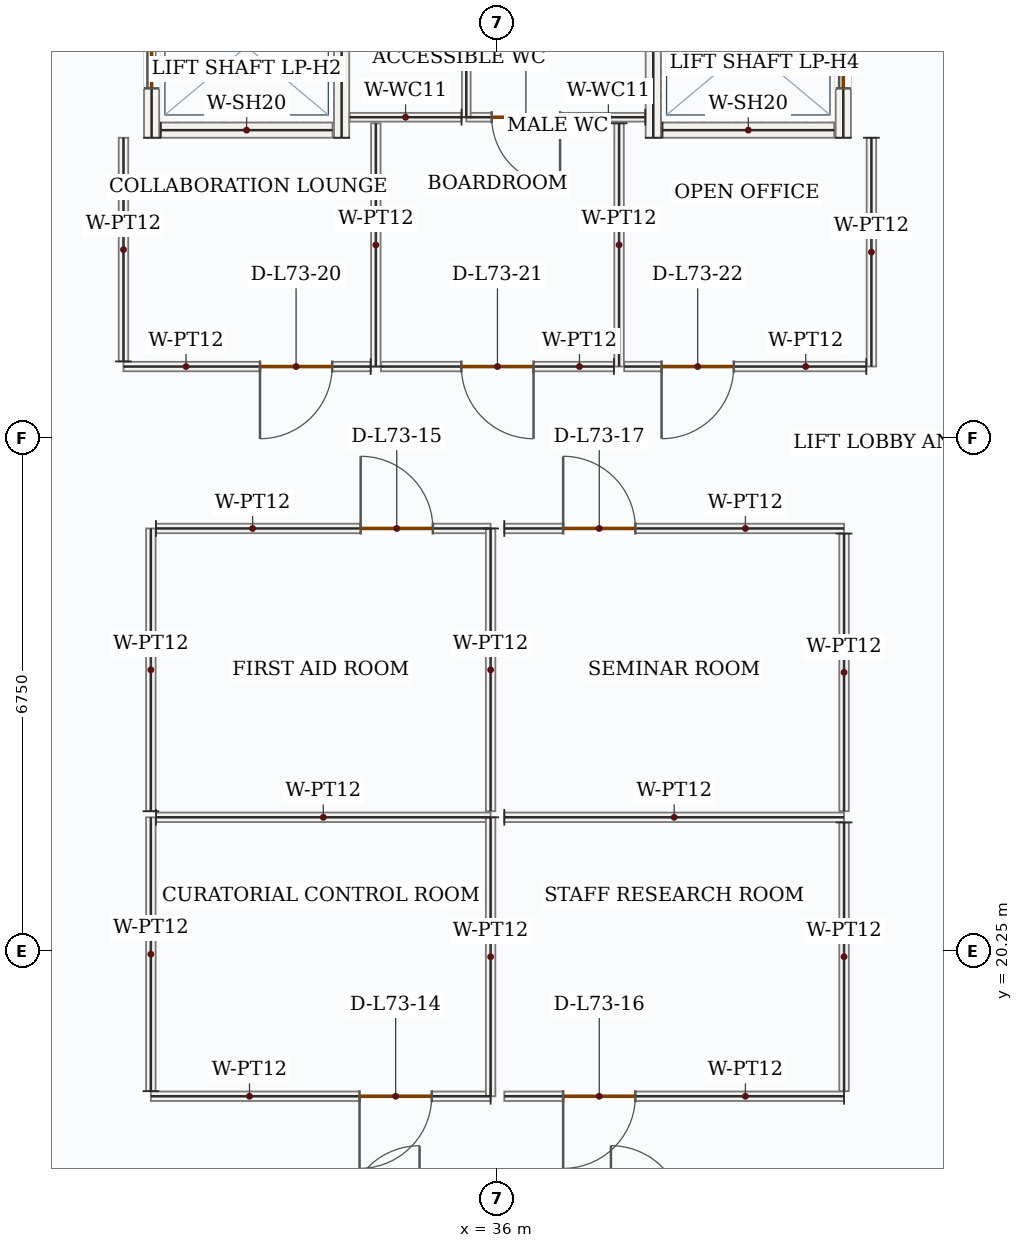
"""IFC4 building model, lengths in metres.
Left out: names, types, materials, properties, quantities, classifications, styles, units other than length and angle.
Written with IfcOpenShell. Run it as: python <this file> out.ifc"""

import sys

from ifc_helpers import new_model, si_unit, direction, frame, frame_2d, origin, place, context, subcontext, project, spatial, rectangle, extrude, source, transform, mapped, element, fill, save


model = new_model("IFC4")
c1 = context("Model", 3, precision=1e-05, world=origin(), true_north=direction((0.0, 1.0)))
c2 = subcontext(c1, "Body", "Model", "MODEL_VIEW")
j1 = project(units=[si_unit("LENGTHUNIT", "METRE"), si_unit("PLANEANGLEUNIT", "RADIAN")], contexts=[c1])
p1 = place(None, origin())
s1 = spatial("IfcSite", under=j1, at=p1, CompositionType="ELEMENT")
p2 = place(p1, origin())
s2 = spatial("IfcBuilding", under=s1, at=p2, CompositionType="ELEMENT")
p3 = place(p2, frame((0.0, 0.0, 302.85)))
s3 = spatial("IfcBuildingStorey", under=s2, at=p3, CompositionType="ELEMENT", Elevation=302.85)
p4 = place(p3, frame((31.45, 30.95, 0.0), z_axis=(0.0, 0.0, 1.0), x_axis=(0.0, 1.0, 0.0)))
e1 = element("IfcWall", 1, at=p4, inside=s3, PredefinedType="SOLIDWALL", context=c2, shape_type="SweptSolid", body=[
    extrude(rectangle(XDim=2.4, YDim=0.2, at=frame_2d((1.2, 0.0))), origin(), (0.0, 0.0, 1.0), 3.5),
])
p5 = place(p4, frame((0.65, 0.0, 0.0)))
e2 = element("IfcOpeningElement", 2, at=p5, cuts=e1, PredefinedType="OPENING", context=c2, shape_type="SweptSolid", body=[
    extrude(rectangle(XDim=1.1, YDim=2.15, at=frame_2d((0.55, 1.075))), frame((0.0, 0.11, 0.0), z_axis=(0.0, -1.0, 0.0), x_axis=(1.0, 0.0, 0.0)), (0.0, 0.0, 1.0), 0.22),
])
m1 = source(origin(), c2, "Body", "SweptSolid", [
    extrude(rectangle(XDim=2.4, YDim=0.2, at=frame_2d((1.2, 0.0))), origin(), (0.0, 0.0, 1.0), 3.5),
])
p6 = place(p3, frame((33.95, 30.95, 0.0), z_axis=(0.0, 0.0, 1.0), x_axis=(0.0, 1.0, 0.0)))
e3 = element("IfcWall", 3, at=p6, inside=s3, PredefinedType="SOLIDWALL", context=c2, shape_type="MappedRepresentation", body=[
    mapped(m1, transform((0.0, 0.0, 0.0), x_axis=(1.0, 0.0, 0.0), y_axis=(0.0, 1.0, 0.0), z_axis=(0.0, 0.0, 1.0), scale=1.0)),
])
m2 = source(origin(), c2, "Body", "SweptSolid", [
    extrude(rectangle(XDim=2.26, YDim=0.2, at=frame_2d((1.13, 0.0))), origin(), (0.0, 0.0, 1.0), 3.5),
])
p7 = place(p3, frame((31.57, 31.05, 0.0), z_axis=(0.0, 0.0, 1.0), x_axis=(1.0, 0.0, 0.0)))
e4 = element("IfcWall", 4, at=p7, inside=s3, PredefinedType="SOLIDWALL", context=c2, shape_type="MappedRepresentation", body=[
    mapped(m2, transform((0.0, 0.0, 0.0), x_axis=(1.0, 0.0, 0.0), y_axis=(0.0, 1.0, 0.0), z_axis=(0.0, 0.0, 1.0), scale=1.0)),
])
p8 = place(p3, frame((38.05, 30.95, 0.0), z_axis=(0.0, 0.0, 1.0), x_axis=(0.0, 1.0, 0.0)))
e5 = element("IfcWall", 5, at=p8, inside=s3, PredefinedType="SOLIDWALL", context=c2, shape_type="MappedRepresentation", body=[
    mapped(m1, transform((0.0, 0.0, 0.0), x_axis=(1.0, 0.0, 0.0), y_axis=(0.0, 1.0, 0.0), z_axis=(0.0, 0.0, 1.0), scale=1.0)),
])
p9 = place(p3, frame((40.55, 30.95, 0.0), z_axis=(0.0, 0.0, 1.0), x_axis=(0.0, 1.0, 0.0)))
e6 = element("IfcWall", 6, at=p9, inside=s3, PredefinedType="SOLIDWALL", context=c2, shape_type="SweptSolid", body=[
    extrude(rectangle(XDim=2.4, YDim=0.2, at=frame_2d((1.2, 0.0))), origin(), (0.0, 0.0, 1.0), 3.5),
])
p10 = place(p9, frame((0.65, 0.0, 0.0)))
e7 = element("IfcOpeningElement", 7, at=p10, cuts=e6, PredefinedType="OPENING", context=c2, shape_type="SweptSolid", body=[
    extrude(rectangle(XDim=1.1, YDim=2.15, at=frame_2d((0.55, 1.075))), frame((0.0, 0.11, 0.0), z_axis=(0.0, -1.0, 0.0), x_axis=(1.0, 0.0, 0.0)), (0.0, 0.0, 1.0), 0.22),
])
p11 = place(p3, frame((38.17, 31.05, 0.0), z_axis=(0.0, 0.0, 1.0), x_axis=(1.0, 0.0, 0.0)))
e8 = element("IfcWall", 8, at=p11, inside=s3, PredefinedType="SOLIDWALL", context=c2, shape_type="MappedRepresentation", body=[
    mapped(m2, transform((0.0, 0.0, 0.0), x_axis=(1.0, 0.0, 0.0), y_axis=(0.0, 1.0, 0.0), z_axis=(0.0, 0.0, 1.0), scale=1.0)),
])
p12 = place(p3, frame((37.945, 31.22, 0.0), z_axis=(0.0, 0.0, 1.0), x_axis=(-1.0, 0.0, 0.0)))
e9 = element("IfcWall", 9, at=p12, inside=s3, PredefinedType="PARTITIONING", context=c2, shape_type="SweptSolid", body=[
    extrude(rectangle(XDim=2.355, YDim=0.115, at=frame_2d((1.177, 0.0))), origin(), (0.0, 0.0, 1.0), 3.5),
])
p13 = place(p12, frame((1.121, 0.0, 0.0)))
e10 = element("IfcOpeningElement", 10, at=p13, cuts=e9, PredefinedType="OPENING", context=c2, shape_type="SweptSolid", body=[
    extrude(rectangle(XDim=0.9, YDim=2.1, at=frame_2d((0.45, 1.05))), frame((0.0, 0.067, 0.0), z_axis=(0.0, -1.0, 0.0), x_axis=(1.0, 0.0, 0.0)), (0.0, 0.0, 1.0), 0.135),
])
m3 = source(origin(), c2, "Body", "SweptSolid", [
    extrude(rectangle(XDim=1.96, YDim=0.115, at=frame_2d((0.98, 0.0))), origin(), (0.0, 0.0, 1.0), 3.5),
])
p14 = place(p3, frame((35.59, 31.22, 0.0), z_axis=(0.0, 0.0, 1.0), x_axis=(0.0, 1.0, 0.0)))
e11 = element("IfcWall", 11, at=p14, inside=s3, PredefinedType="PARTITIONING", context=c2, shape_type="MappedRepresentation", body=[
    mapped(m3, transform((0.0, 0.0, 0.0), x_axis=(1.0, 0.0, 0.0), y_axis=(0.0, 1.0, 0.0), z_axis=(0.0, 0.0, 1.0), scale=1.0)),
])
m4 = source(origin(), c2, "Body", "SweptSolid", [
    extrude(rectangle(XDim=1.473, YDim=0.115, at=frame_2d((0.736, 0.0))), origin(), (0.0, 0.0, 1.0), 3.5),
])
p15 = place(p3, frame((35.528, 31.22, 0.0), z_axis=(0.0, 0.0, 1.0), x_axis=(-1.0, 0.0, 0.0)))
e12 = element("IfcWall", 12, at=p15, inside=s3, PredefinedType="PARTITIONING", context=c2, shape_type="MappedRepresentation", body=[
    mapped(m4, transform((0.0, 0.0, 0.0), x_axis=(1.0, 0.0, 0.0), y_axis=(0.0, 1.0, 0.0), z_axis=(0.0, 0.0, 1.0), scale=1.0)),
])
m5 = source(origin(), c2, "Body", "SweptSolid", [
    extrude(rectangle(XDim=3.2, YDim=0.125, at=frame_2d((1.6, 0.0))), origin(), (0.0, 0.0, 1.0), 3.5),
])
for number, where, z_axis, x_axis in (
    (13, (34.4, 27.94, 0.0), (0.0, 0.0, 1.0), (0.0, 1.0, 0.0)),
    (14, (37.6, 31.14, 0.0), (0.0, 0.0, 1.0), (0.0, -1.0, 0.0)),
):
    element("IfcWall", number, at=place(p3, frame(where, z_axis=z_axis, x_axis=x_axis)), inside=s3, PredefinedType="PARTITIONING", context=c2, shape_type="MappedRepresentation", body=[
        mapped(m5, transform((0.0, 0.0, 0.0), x_axis=(1.0, 0.0, 0.0), y_axis=(0.0, 1.0, 0.0), z_axis=(0.0, 0.0, 1.0), scale=1.0)),
    ])
p16 = place(p3, frame((37.532, 27.94, 0.0), z_axis=(0.0, 0.0, 1.0), x_axis=(-1.0, 0.0, 0.0)))
e15 = element("IfcWall", 15, at=p16, inside=s3, PredefinedType="PARTITIONING", context=c2, shape_type="SweptSolid", body=[
    extrude(rectangle(XDim=3.065, YDim=0.125, at=frame_2d((1.532, 0.0))), origin(), (0.0, 0.0, 1.0), 3.5),
])
p17 = place(p16, frame((1.058, 0.0, 0.0)))
e16 = element("IfcOpeningElement", 16, at=p17, cuts=e15, PredefinedType="OPENING", context=c2, shape_type="SweptSolid", body=[
    extrude(rectangle(XDim=0.95, YDim=2.15, at=frame_2d((0.475, 1.075))), frame((0.0, 0.073, 0.0), z_axis=(0.0, -1.0, 0.0), x_axis=(1.0, 0.0, 0.0)), (0.0, 0.0, 1.0), 0.145),
])
p18 = place(p3, frame((34.333, 27.94, 0.0), z_axis=(0.0, 0.0, 1.0), x_axis=(-1.0, 0.0, 0.0)))
e17 = element("IfcWall", 17, at=p18, inside=s3, PredefinedType="PARTITIONING", context=c2, shape_type="SweptSolid", body=[
    extrude(rectangle(XDim=3.252, YDim=0.125, at=frame_2d((1.626, 0.0))), origin(), (0.0, 0.0, 1.0), 3.5),
])
p19 = place(p18, frame((0.507, 0.0, 0.0)))
e18 = element("IfcOpeningElement", 18, at=p19, cuts=e17, PredefinedType="OPENING", context=c2, shape_type="SweptSolid", body=[
    extrude(rectangle(XDim=0.95, YDim=2.15, at=frame_2d((0.475, 1.075))), frame((0.0, 0.073, 0.0), z_axis=(0.0, -1.0, 0.0), x_axis=(1.0, 0.0, 0.0)), (0.0, 0.0, 1.0), 0.145),
])
m6 = source(origin(), c2, "Body", "SweptSolid", [
    extrude(rectangle(XDim=2.942, YDim=0.125, at=frame_2d((1.471, 0.0))), origin(), (0.0, 0.0, 1.0), 3.5),
])
p20 = place(p3, frame((31.08, 28.008, 0.0), z_axis=(0.0, 0.0, 1.0), x_axis=(0.0, 1.0, 0.0)))
e19 = element("IfcWall", 19, at=p20, inside=s3, PredefinedType="PARTITIONING", context=c2, shape_type="MappedRepresentation", body=[
    mapped(m6, transform((0.0, 0.0, 0.0), x_axis=(1.0, 0.0, 0.0), y_axis=(0.0, 1.0, 0.0), z_axis=(0.0, 0.0, 1.0), scale=1.0)),
])
m7 = source(origin(), c2, "Body", "SweptSolid", [
    extrude(rectangle(XDim=3.01, YDim=0.125, at=frame_2d((1.505, 0.0))), origin(), (0.0, 0.0, 1.0), 3.5),
])
p21 = place(p3, frame((40.92, 30.95, 0.0), z_axis=(0.0, 0.0, 1.0), x_axis=(0.0, -1.0, 0.0)))
e20 = element("IfcWall", 20, at=p21, inside=s3, PredefinedType="PARTITIONING", context=c2, shape_type="MappedRepresentation", body=[
    mapped(m7, transform((0.0, 0.0, 0.0), x_axis=(1.0, 0.0, 0.0), y_axis=(0.0, 1.0, 0.0), z_axis=(0.0, 0.0, 1.0), scale=1.0)),
])
p22 = place(p3, frame((40.853, 27.94, 0.0), z_axis=(0.0, 0.0, 1.0), x_axis=(-1.0, 0.0, 0.0)))
e21 = element("IfcWall", 21, at=p22, inside=s3, PredefinedType="PARTITIONING", context=c2, shape_type="SweptSolid", body=[
    extrude(rectangle(XDim=3.185, YDim=0.125, at=frame_2d((1.593, 0.0))), origin(), (0.0, 0.0, 1.0), 3.5),
])
p23 = place(p22, frame((1.743, 0.0, 0.0)))
e22 = element("IfcOpeningElement", 22, at=p23, cuts=e21, PredefinedType="OPENING", context=c2, shape_type="SweptSolid", body=[
    extrude(rectangle(XDim=0.95, YDim=2.15, at=frame_2d((0.475, 1.075))), frame((0.0, 0.073, 0.0), z_axis=(0.0, -1.0, 0.0), x_axis=(1.0, 0.0, 0.0)), (0.0, 0.0, 1.0), 0.145),
])
p24 = place(p3, frame((35.91, 18.34, 0.0), z_axis=(0.0, 0.0, 1.0), x_axis=(-1.0, 0.0, 0.0)))
e23 = element("IfcWall", 23, at=p24, inside=s3, PredefinedType="PARTITIONING", context=c2, shape_type="SweptSolid", body=[
    extrude(rectangle(XDim=4.47, YDim=0.125, at=frame_2d((2.235, 0.0))), origin(), (0.0, 0.0, 1.0), 3.5),
])
p25 = place(p24, frame((0.774, 0.0, 0.0)))
e24 = element("IfcOpeningElement", 24, at=p25, cuts=e23, PredefinedType="OPENING", context=c2, shape_type="SweptSolid", body=[
    extrude(rectangle(XDim=0.95, YDim=2.15, at=frame_2d((0.475, 1.075))), frame((0.0, 0.073, 0.0), z_axis=(0.0, -1.0, 0.0), x_axis=(1.0, 0.0, 0.0)), (0.0, 0.0, 1.0), 0.145),
])
m8 = source(origin(), c2, "Body", "SweptSolid", [
    extrude(rectangle(XDim=3.603, YDim=0.125, at=frame_2d((1.801, 0.0))), origin(), (0.0, 0.0, 1.0), 3.5),
])
p26 = place(p3, frame((31.44, 18.407, 0.0), z_axis=(0.0, 0.0, 1.0), x_axis=(0.0, 1.0, 0.0)))
e25 = element("IfcWall", 25, at=p26, inside=s3, PredefinedType="PARTITIONING", context=c2, shape_type="MappedRepresentation", body=[
    mapped(m8, transform((0.0, 0.0, 0.0), x_axis=(1.0, 0.0, 0.0), y_axis=(0.0, 1.0, 0.0), z_axis=(0.0, 0.0, 1.0), scale=1.0)),
])
m9 = source(origin(), c2, "Body", "SweptSolid", [
    extrude(rectangle(XDim=4.402, YDim=0.125, at=frame_2d((2.201, 0.0))), origin(), (0.0, 0.0, 1.0), 3.5),
])
p27 = place(p3, frame((31.508, 22.01, 0.0), z_axis=(0.0, 0.0, 1.0), x_axis=(1.0, 0.0, 0.0)))
e26 = element("IfcWall", 26, at=p27, inside=s3, PredefinedType="PARTITIONING", context=c2, shape_type="MappedRepresentation", body=[
    mapped(m9, transform((0.0, 0.0, 0.0), x_axis=(1.0, 0.0, 0.0), y_axis=(0.0, 1.0, 0.0), z_axis=(0.0, 0.0, 1.0), scale=1.0)),
])
m10 = source(origin(), c2, "Body", "SweptSolid", [
    extrude(rectangle(XDim=3.67, YDim=0.125, at=frame_2d((1.835, 0.0))), origin(), (0.0, 0.0, 1.0), 3.5),
])
p28 = place(p3, frame((35.91, 22.01, 0.0), z_axis=(0.0, 0.0, 1.0), x_axis=(0.0, -1.0, 0.0)))
e27 = element("IfcWall", 27, at=p28, inside=s3, PredefinedType="PARTITIONING", context=c2, shape_type="MappedRepresentation", body=[
    mapped(m10, transform((0.0, 0.0, 0.0), x_axis=(1.0, 0.0, 0.0), y_axis=(0.0, 1.0, 0.0), z_axis=(0.0, 0.0, 1.0), scale=1.0)),
])
p29 = place(p3, frame((40.56, 18.34, 0.0), z_axis=(0.0, 0.0, 1.0), x_axis=(-1.0, 0.0, 0.0)))
e28 = element("IfcWall", 28, at=p29, inside=s3, PredefinedType="PARTITIONING", context=c2, shape_type="SweptSolid", body=[
    extrude(rectangle(XDim=4.47, YDim=0.125, at=frame_2d((2.235, 0.0))), origin(), (0.0, 0.0, 1.0), 3.5),
])
p30 = place(p29, frame((2.746, 0.0, 0.0)))
e29 = element("IfcOpeningElement", 29, at=p30, cuts=e28, PredefinedType="OPENING", context=c2, shape_type="SweptSolid", body=[
    extrude(rectangle(XDim=0.95, YDim=2.15, at=frame_2d((0.475, 1.075))), frame((0.0, 0.073, 0.0), z_axis=(0.0, -1.0, 0.0), x_axis=(1.0, 0.0, 0.0)), (0.0, 0.0, 1.0), 0.145),
])
m11 = source(origin(), c2, "Body", "SweptSolid", [
    extrude(rectangle(XDim=4.47, YDim=0.125, at=frame_2d((2.235, 0.0))), origin(), (0.0, 0.0, 1.0), 3.5),
])
p31 = place(p3, frame((36.09, 22.01, 0.0), z_axis=(0.0, 0.0, 1.0), x_axis=(1.0, 0.0, 0.0)))
e30 = element("IfcWall", 30, at=p31, inside=s3, PredefinedType="PARTITIONING", context=c2, shape_type="MappedRepresentation", body=[
    mapped(m11, transform((0.0, 0.0, 0.0), x_axis=(1.0, 0.0, 0.0), y_axis=(0.0, 1.0, 0.0), z_axis=(0.0, 0.0, 1.0), scale=1.0)),
])
m12 = source(origin(), c2, "Body", "SweptSolid", [
    extrude(rectangle(XDim=3.535, YDim=0.125, at=frame_2d((1.768, 0.0))), origin(), (0.0, 0.0, 1.0), 3.5),
])
p32 = place(p3, frame((40.56, 21.942, 0.0), z_axis=(0.0, 0.0, 1.0), x_axis=(0.0, -1.0, 0.0)))
e31 = element("IfcWall", 31, at=p32, inside=s3, PredefinedType="PARTITIONING", context=c2, shape_type="MappedRepresentation", body=[
    mapped(m12, transform((0.0, 0.0, 0.0), x_axis=(1.0, 0.0, 0.0), y_axis=(0.0, 1.0, 0.0), z_axis=(0.0, 0.0, 1.0), scale=1.0)),
])
m13 = source(origin(), c2, "Body", "SweptSolid", [
    extrude(rectangle(XDim=3.72, YDim=0.125, at=frame_2d((1.86, 0.0))), origin(), (0.0, 0.0, 1.0), 3.5),
])
p33 = place(p3, frame((31.44, 22.09, 0.0), z_axis=(0.0, 0.0, 1.0), x_axis=(0.0, 1.0, 0.0)))
e32 = element("IfcWall", 32, at=p33, inside=s3, PredefinedType="PARTITIONING", context=c2, shape_type="MappedRepresentation", body=[
    mapped(m13, transform((0.0, 0.0, 0.0), x_axis=(1.0, 0.0, 0.0), y_axis=(0.0, 1.0, 0.0), z_axis=(0.0, 0.0, 1.0), scale=1.0)),
])
p34 = place(p3, frame((31.508, 25.81, 0.0), z_axis=(0.0, 0.0, 1.0), x_axis=(1.0, 0.0, 0.0)))
e33 = element("IfcWall", 33, at=p34, inside=s3, PredefinedType="PARTITIONING", context=c2, shape_type="SweptSolid", body=[
    extrude(rectangle(XDim=4.402, YDim=0.125, at=frame_2d((2.201, 0.0))), origin(), (0.0, 0.0, 1.0), 3.5),
])
p35 = place(p34, frame((2.693, 0.0, 0.0)))
e34 = element("IfcOpeningElement", 34, at=p35, cuts=e33, PredefinedType="OPENING", context=c2, shape_type="SweptSolid", body=[
    extrude(rectangle(XDim=0.95, YDim=2.15, at=frame_2d((0.475, 1.075))), frame((0.0, 0.073, 0.0), z_axis=(0.0, -1.0, 0.0), x_axis=(1.0, 0.0, 0.0)), (0.0, 0.0, 1.0), 0.145),
])
p36 = place(p3, frame((35.91, 25.81, 0.0), z_axis=(0.0, 0.0, 1.0), x_axis=(0.0, -1.0, 0.0)))
e35 = element("IfcWall", 35, at=p36, inside=s3, PredefinedType="PARTITIONING", context=c2, shape_type="MappedRepresentation", body=[
    mapped(m13, transform((0.0, 0.0, 0.0), x_axis=(1.0, 0.0, 0.0), y_axis=(0.0, 1.0, 0.0), z_axis=(0.0, 0.0, 1.0), scale=1.0)),
])
p37 = place(p3, frame((36.09, 25.81, 0.0), z_axis=(0.0, 0.0, 1.0), x_axis=(1.0, 0.0, 0.0)))
e36 = element("IfcWall", 36, at=p37, inside=s3, PredefinedType="PARTITIONING", context=c2, shape_type="SweptSolid", body=[
    extrude(rectangle(XDim=4.47, YDim=0.125, at=frame_2d((2.235, 0.0))), origin(), (0.0, 0.0, 1.0), 3.5),
])
p38 = place(p37, frame((0.774, 0.0, 0.0)))
e37 = element("IfcOpeningElement", 37, at=p38, cuts=e36, PredefinedType="OPENING", context=c2, shape_type="SweptSolid", body=[
    extrude(rectangle(XDim=0.95, YDim=2.15, at=frame_2d((0.475, 1.075))), frame((0.0, 0.073, 0.0), z_axis=(0.0, -1.0, 0.0), x_axis=(1.0, 0.0, 0.0)), (0.0, 0.0, 1.0), 0.145),
])
m14 = source(origin(), c2, "Body", "SweptSolid", [
    extrude(rectangle(XDim=3.652, YDim=0.125, at=frame_2d((1.826, 0.0))), origin(), (0.0, 0.0, 1.0), 3.5),
])
p39 = place(p3, frame((40.56, 25.742, 0.0), z_axis=(0.0, 0.0, 1.0), x_axis=(0.0, -1.0, 0.0)))
e38 = element("IfcWall", 38, at=p39, inside=s3, PredefinedType="PARTITIONING", context=c2, shape_type="MappedRepresentation", body=[
    mapped(m14, transform((0.0, 0.0, 0.0), x_axis=(1.0, 0.0, 0.0), y_axis=(0.0, 1.0, 0.0), z_axis=(0.0, 0.0, 1.0), scale=1.0)),
])
m15 = source(origin(), c2, "Body", "SweptSolid", [
    extrude(rectangle(XDim=1.1, YDim=2.15, at=frame_2d((0.55, 1.075))), frame((0.0, 0.025, 0.0), z_axis=(0.0, -1.0, 0.0), x_axis=(1.0, 0.0, 0.0)), (0.0, 0.0, 1.0), 0.05),
])
p40 = place(p5, origin())
e39 = element("IfcDoor", 39, at=p40, inside=s3, OperationType="DOUBLE_DOOR_SLIDING", PredefinedType="DOOR", context=c2, shape_type="MappedRepresentation", body=[
    mapped(m15, transform((0.0, 0.0, 0.0), x_axis=(1.0, 0.0, 0.0), y_axis=(0.0, 1.0, 0.0), z_axis=(0.0, 0.0, 1.0), scale=1.0)),
])
fill(e2, e39)
p41 = place(p10, origin())
e40 = element("IfcDoor", 40, at=p41, inside=s3, OperationType="DOUBLE_DOOR_SLIDING", PredefinedType="DOOR", context=c2, shape_type="MappedRepresentation", body=[
    mapped(m15, transform((0.0, 0.0, 0.0), x_axis=(1.0, 0.0, 0.0), y_axis=(0.0, 1.0, 0.0), z_axis=(0.0, 0.0, 1.0), scale=1.0)),
])
fill(e7, e40)
m16 = source(origin(), c2, "Body", "SweptSolid", [
    extrude(rectangle(XDim=0.95, YDim=2.15, at=frame_2d((0.475, 1.075))), frame((0.0, 0.025, 0.0), z_axis=(0.0, -1.0, 0.0), x_axis=(1.0, 0.0, 0.0)), (0.0, 0.0, 1.0), 0.05),
])
p42 = place(p25, origin())
e41 = element("IfcDoor", 41, at=p42, inside=s3, OperationType="SINGLE_SWING_RIGHT", PredefinedType="DOOR", context=c2, shape_type="MappedRepresentation", body=[
    mapped(m16, transform((0.0, 0.0, 0.0), x_axis=(1.0, 0.0, 0.0), y_axis=(0.0, 1.0, 0.0), z_axis=(0.0, 0.0, 1.0), scale=1.0)),
])
fill(e24, e41)
p43 = place(p35, origin())
e42 = element("IfcDoor", 42, at=p43, inside=s3, OperationType="SINGLE_SWING_LEFT", PredefinedType="DOOR", context=c2, shape_type="MappedRepresentation", body=[
    mapped(m16, transform((0.0, 0.0, 0.0), x_axis=(1.0, 0.0, 0.0), y_axis=(0.0, 1.0, 0.0), z_axis=(0.0, 0.0, 1.0), scale=1.0)),
])
fill(e34, e42)
p44 = place(p30, origin())
e43 = element("IfcDoor", 43, at=p44, inside=s3, OperationType="SINGLE_SWING_RIGHT", PredefinedType="DOOR", context=c2, shape_type="MappedRepresentation", body=[
    mapped(m16, transform((0.0, 0.0, 0.0), x_axis=(1.0, 0.0, 0.0), y_axis=(0.0, 1.0, 0.0), z_axis=(0.0, 0.0, 1.0), scale=1.0)),
])
fill(e29, e43)
p45 = place(p38, origin())
e44 = element("IfcDoor", 44, at=p45, inside=s3, OperationType="SINGLE_SWING_LEFT", PredefinedType="DOOR", context=c2, shape_type="MappedRepresentation", body=[
    mapped(m16, transform((0.0, 0.0, 0.0), x_axis=(1.0, 0.0, 0.0), y_axis=(0.0, 1.0, 0.0), z_axis=(0.0, 0.0, 1.0), scale=1.0)),
])
fill(e37, e44)
p46 = place(p19, origin())
e45 = element("IfcDoor", 45, at=p46, inside=s3, OperationType="SINGLE_SWING_RIGHT", PredefinedType="DOOR", context=c2, shape_type="MappedRepresentation", body=[
    mapped(m16, transform((0.0, 0.0, 0.0), x_axis=(1.0, 0.0, 0.0), y_axis=(0.0, 1.0, 0.0), z_axis=(0.0, 0.0, 1.0), scale=1.0)),
])
fill(e18, e45)
p47 = place(p17, origin())
e46 = element("IfcDoor", 46, at=p47, inside=s3, OperationType="SINGLE_SWING_LEFT", PredefinedType="DOOR", context=c2, shape_type="MappedRepresentation", body=[
    mapped(m16, transform((0.0, 0.0, 0.0), x_axis=(1.0, 0.0, 0.0), y_axis=(0.0, 1.0, 0.0), z_axis=(0.0, 0.0, 1.0), scale=1.0)),
])
fill(e16, e46)
p48 = place(p23, origin())
e47 = element("IfcDoor", 47, at=p48, inside=s3, OperationType="SINGLE_SWING_RIGHT", PredefinedType="DOOR", context=c2, shape_type="MappedRepresentation", body=[
    mapped(m16, transform((0.0, 0.0, 0.0), x_axis=(1.0, 0.0, 0.0), y_axis=(0.0, 1.0, 0.0), z_axis=(0.0, 0.0, 1.0), scale=1.0)),
])
fill(e22, e47)
m17 = source(origin(), c2, "Body", "SweptSolid", [
    extrude(rectangle(XDim=0.9, YDim=2.1, at=frame_2d((0.45, 1.05))), frame((0.0, 0.025, 0.0), z_axis=(0.0, -1.0, 0.0), x_axis=(1.0, 0.0, 0.0)), (0.0, 0.0, 1.0), 0.05),
])
p49 = place(p13, origin())
e48 = element("IfcDoor", 48, at=p49, inside=s3, OperationType="SINGLE_SWING_LEFT", PredefinedType="DOOR", context=c2, shape_type="MappedRepresentation", body=[
    mapped(m17, transform((0.0, 0.0, 0.0), x_axis=(1.0, 0.0, 0.0), y_axis=(0.0, 1.0, 0.0), z_axis=(0.0, 0.0, 1.0), scale=1.0)),
])
fill(e10, e48)
save(model, sys.argv[1])
